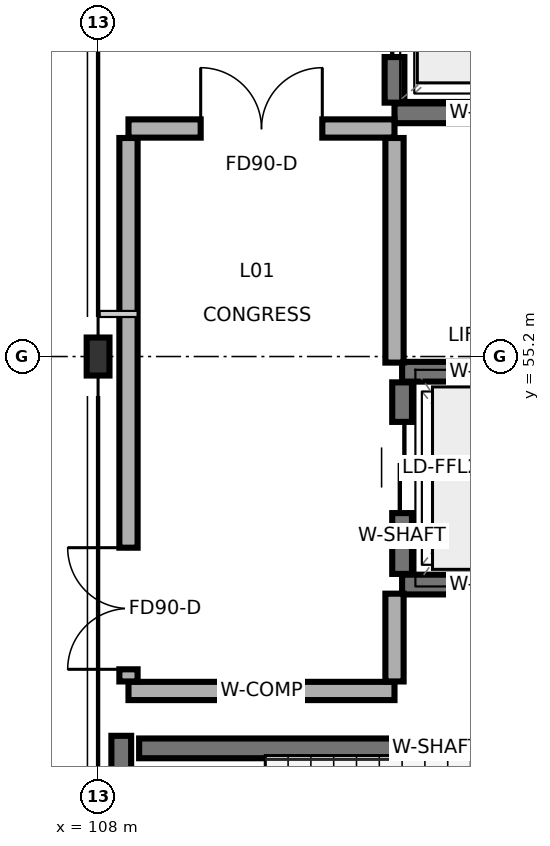
"""IFC4 building model, lengths in metres.
Left out: names, types, materials, properties, quantities, classifications, styles, units other than length and angle.
Written with IfcOpenShell. Run it as: python <this file> out.ifc"""

import sys

from ifc_helpers import new_model, si_unit, direction, frame, frame_2d, origin, origin_2d, place, context, subcontext, project, spatial, rectangle, i_section, extrude, element, fill, save


model = new_model("IFC4")
c1 = context("Model", 3, precision=1e-05, world=origin(), true_north=direction((0.0, 1.0)))
c2 = subcontext(c1, "Body", "Model", "MODEL_VIEW")
j1 = project(units=[si_unit("LENGTHUNIT", "METRE"), si_unit("PLANEANGLEUNIT", "RADIAN")], contexts=[c1])
p1 = place(None, origin())
s1 = spatial("IfcSite", under=j1, at=p1, CompositionType="ELEMENT")
p2 = place(p1, origin())
s2 = spatial("IfcBuilding", under=s1, at=p2, CompositionType="ELEMENT")
p3 = place(p2, origin())
s3 = spatial("IfcBuildingStorey", under=s2, at=p3, CompositionType="ELEMENT", Elevation=0.0)
p4 = place(p3, frame((108.0, 55.2, 0.0), z_axis=(0.0, 0.0, 1.0), x_axis=(1.0, 0.0, 0.0)))
e1 = element("IfcColumn", 1, at=p4, inside=s3, PredefinedType="COLUMN", context=c2, shape_type="SweptSolid", body=[
    extrude(i_section(OverallWidth=0.3, OverallDepth=0.5, WebThickness=0.014, FlangeThickness=0.028, FilletRadius=0.027, at=origin_2d()), origin(), (0.0, 0.0, 1.0), 5.4),
])
p5 = place(p3, frame((108.305, 45.94, 0.0), z_axis=(0.0, 0.0, 1.0), x_axis=(0.0, 1.0, 0.0)))
e2 = element("IfcWall", 2, at=p5, inside=s3, PredefinedType="SHEAR", context=c2, shape_type="SweptSolid", body=[
    extrude(rectangle(XDim=4.27, YDim=0.26, at=frame_2d((2.135, 0.0))), origin(), (0.0, 0.0, 1.0), 5.14),
])
p6 = place(p3, frame((108.54, 50.045, 0.0), z_axis=(0.0, 0.0, 1.0), x_axis=(1.0, 0.0, 0.0)))
e3 = element("IfcWall", 3, at=p6, inside=s3, PredefinedType="SHEAR", context=c2, shape_type="SweptSolid", body=[
    extrude(rectangle(XDim=8.52, YDim=0.26, at=frame_2d((4.26, 0.0))), origin(), (0.0, 0.0, 1.0), 5.14),
])
for number, where, z_axis, x_axis in (
    (4, (112.0, 52.2, 0.0), (0.0, 0.0, 1.0), (1.0, 0.0, 0.0)),
    (5, (112.0, 55.0, 0.0), (0.0, 0.0, 1.0), (1.0, 0.0, 0.0)),
):
    element("IfcWall", number, at=place(p3, frame(where, z_axis=z_axis, x_axis=x_axis)), inside=s3, PredefinedType="SHEAR", context=c2, shape_type="SweptSolid", body=[
        extrude(rectangle(XDim=2.4, YDim=0.26, at=frame_2d((1.2, 0.0))), origin(), (0.0, 0.0, 1.0), 4.685),
    ])
p7 = place(p3, frame((112.0, 52.34, 0.0), z_axis=(0.0, 0.0, 1.0), x_axis=(0.0, 1.0, 0.0)))
e6 = element("IfcWall", 6, at=p7, inside=s3, PredefinedType="SHEAR", context=c2, shape_type="SweptSolid", body=[
    extrude(rectangle(XDim=2.52, YDim=0.26, at=frame_2d((1.26, 0.0))), origin(), (0.0, 0.0, 1.0), 4.685),
])
p8 = place(p7, frame((0.8, 0.0, 0.0)))
e7 = element("IfcOpeningElement", 7, at=p8, cuts=e6, PredefinedType="OPENING", context=c2, shape_type="SweptSolid", body=[
    extrude(rectangle(XDim=1.2, YDim=2.2, at=frame_2d((0.6, 1.1))), frame((0.0, 0.14, 0.0), z_axis=(0.0, -1.0, 0.0), x_axis=(1.0, 0.0, 0.0)), (0.0, 0.0, 1.0), 0.28),
])
p9 = place(p3, frame((111.9, 58.4, 0.0), z_axis=(0.0, 0.0, 1.0), x_axis=(1.0, 0.0, 0.0)))
e8 = element("IfcWall", 8, at=p9, inside=s3, PredefinedType="SHEAR", context=c2, shape_type="SweptSolid", body=[
    extrude(rectangle(XDim=2.6, YDim=0.26, at=frame_2d((1.3, 0.0))), origin(), (0.0, 0.0, 1.0), 5.14),
])
p10 = place(p3, frame((111.9, 58.54, 0.0), z_axis=(0.0, 0.0, 1.0), x_axis=(0.0, 1.0, 0.0)))
e9 = element("IfcWall", 9, at=p10, inside=s3, PredefinedType="SHEAR", context=c2, shape_type="SweptSolid", body=[
    extrude(rectangle(XDim=2.12, YDim=0.26, at=frame_2d((1.06, 0.0))), origin(), (0.0, 0.0, 1.0), 5.14),
])
p11 = place(p10, frame((0.6, 0.0, 0.0)))
e10 = element("IfcOpeningElement", 10, at=p11, cuts=e9, PredefinedType="OPENING", context=c2, shape_type="SweptSolid", body=[
    extrude(rectangle(XDim=1.2, YDim=2.2, at=frame_2d((0.6, 1.1))), frame((0.0, 0.14, 0.0), z_axis=(0.0, -1.0, 0.0), x_axis=(1.0, 0.0, 0.0)), (0.0, 0.0, 1.0), 0.28),
])
p12 = place(p3, frame((108.4, 50.8, 0.0), z_axis=(0.0, 0.0, 1.0), x_axis=(1.0, 0.0, 0.0)))
e11 = element("IfcWall", 11, at=p12, inside=s3, PredefinedType="SOLIDWALL", context=c2, shape_type="SweptSolid", body=[
    extrude(rectangle(XDim=3.5, YDim=0.24, at=frame_2d((1.75, 0.0))), origin(), (0.0, 0.0, 1.0), 5.14),
])
p13 = place(p3, frame((108.4, 50.925, 0.0), z_axis=(0.0, 0.0, 1.0), x_axis=(0.0, 1.0, 0.0)))
e12 = element("IfcWall", 12, at=p13, inside=s3, PredefinedType="SOLIDWALL", context=c2, shape_type="SweptSolid", body=[
    extrude(rectangle(XDim=7.15, YDim=0.24, at=frame_2d((3.575, 0.0))), origin(), (0.0, 0.0, 1.0), 4.685),
])
p14 = place(p13, frame((0.16, 0.0, 0.0)))
e13 = element("IfcOpeningElement", 13, at=p14, cuts=e12, PredefinedType="OPENING", context=c2, shape_type="SweptSolid", body=[
    extrude(rectangle(XDim=1.6, YDim=2.2, at=frame_2d((0.8, 1.1))), frame((0.0, 0.13, 0.0), z_axis=(0.0, -1.0, 0.0), x_axis=(1.0, 0.0, 0.0)), (0.0, 0.0, 1.0), 0.26),
])
p15 = place(p3, frame((108.4, 58.2, 0.0), z_axis=(0.0, 0.0, 1.0), x_axis=(1.0, 0.0, 0.0)))
e14 = element("IfcWall", 14, at=p15, inside=s3, PredefinedType="SOLIDWALL", context=c2, shape_type="SweptSolid", body=[
    extrude(rectangle(XDim=3.5, YDim=0.24, at=frame_2d((1.75, 0.0))), origin(), (0.0, 0.0, 1.0), 5.14),
])
p16 = place(p15, frame((0.95, 0.0, 0.0)))
e15 = element("IfcOpeningElement", 15, at=p16, cuts=e14, PredefinedType="OPENING", context=c2, shape_type="SweptSolid", body=[
    extrude(rectangle(XDim=1.6, YDim=2.2, at=frame_2d((0.8, 1.1))), frame((0.0, 0.13, 0.0), z_axis=(0.0, -1.0, 0.0), x_axis=(1.0, 0.0, 0.0)), (0.0, 0.0, 1.0), 0.26),
])
p17 = place(p3, frame((111.9, 50.925, 0.0), z_axis=(0.0, 0.0, 1.0), x_axis=(0.0, 1.0, 0.0)))
e16 = element("IfcWall", 16, at=p17, inside=s3, PredefinedType="SOLIDWALL", context=c2, shape_type="SweptSolid", body=[
    extrude(rectangle(XDim=1.155, YDim=0.24, at=frame_2d((0.578, 0.0))), origin(), (0.0, 0.0, 1.0), 5.14),
])
p18 = place(p3, frame((111.9, 55.12, 0.0), z_axis=(0.0, 0.0, 1.0), x_axis=(0.0, 1.0, 0.0)))
e17 = element("IfcWall", 17, at=p18, inside=s3, PredefinedType="SOLIDWALL", context=c2, shape_type="SweptSolid", body=[
    extrude(rectangle(XDim=2.955, YDim=0.24, at=frame_2d((1.478, 0.0))), origin(), (0.0, 0.0, 1.0), 4.685),
])
p19 = place(p8, origin())
e18 = element("IfcDoor", 18, at=p19, inside=s3, OperationType="SLIDING_TO_LEFT", PredefinedType="DOOR", context=c2, shape_type="SweptSolid", body=[
    extrude(rectangle(XDim=1.2, YDim=2.2, at=frame_2d((0.6, 1.1))), frame((0.0, 0.025, 0.0), z_axis=(0.0, -1.0, 0.0), x_axis=(1.0, 0.0, 0.0)), (0.0, 0.0, 1.0), 0.05),
])
fill(e7, e18)
p20 = place(p11, origin())
e19 = element("IfcDoor", 19, at=p20, inside=s3, OperationType="SLIDING_TO_RIGHT", PredefinedType="DOOR", context=c2, shape_type="SweptSolid", body=[
    extrude(rectangle(XDim=1.2, YDim=2.2, at=frame_2d((0.6, 1.1))), frame((0.0, 0.025, 0.0), z_axis=(0.0, -1.0, 0.0), x_axis=(1.0, 0.0, 0.0)), (0.0, 0.0, 1.0), 0.05),
])
fill(e10, e19)
p21 = place(p14, origin())
e20 = element("IfcDoor", 20, at=p21, inside=s3, OperationType="DOUBLE_DOOR_SINGLE_SWING", PredefinedType="DOOR", context=c2, shape_type="SweptSolid", body=[
    extrude(rectangle(XDim=1.6, YDim=2.2, at=frame_2d((0.8, 1.1))), frame((0.0, 0.025, 0.0), z_axis=(0.0, -1.0, 0.0), x_axis=(1.0, 0.0, 0.0)), (0.0, 0.0, 1.0), 0.05),
])
fill(e13, e20)
p22 = place(p16, origin())
e21 = element("IfcDoor", 21, at=p22, inside=s3, OperationType="DOUBLE_DOOR_SINGLE_SWING", PredefinedType="DOOR", context=c2, shape_type="SweptSolid", body=[
    extrude(rectangle(XDim=1.6, YDim=2.2, at=frame_2d((0.8, 1.1))), frame((0.0, 0.025, 0.0), z_axis=(0.0, -1.0, 0.0), x_axis=(1.0, 0.0, 0.0)), (0.0, 0.0, 1.0), 0.05),
])
fill(e15, e21)
save(model, sys.argv[1])
